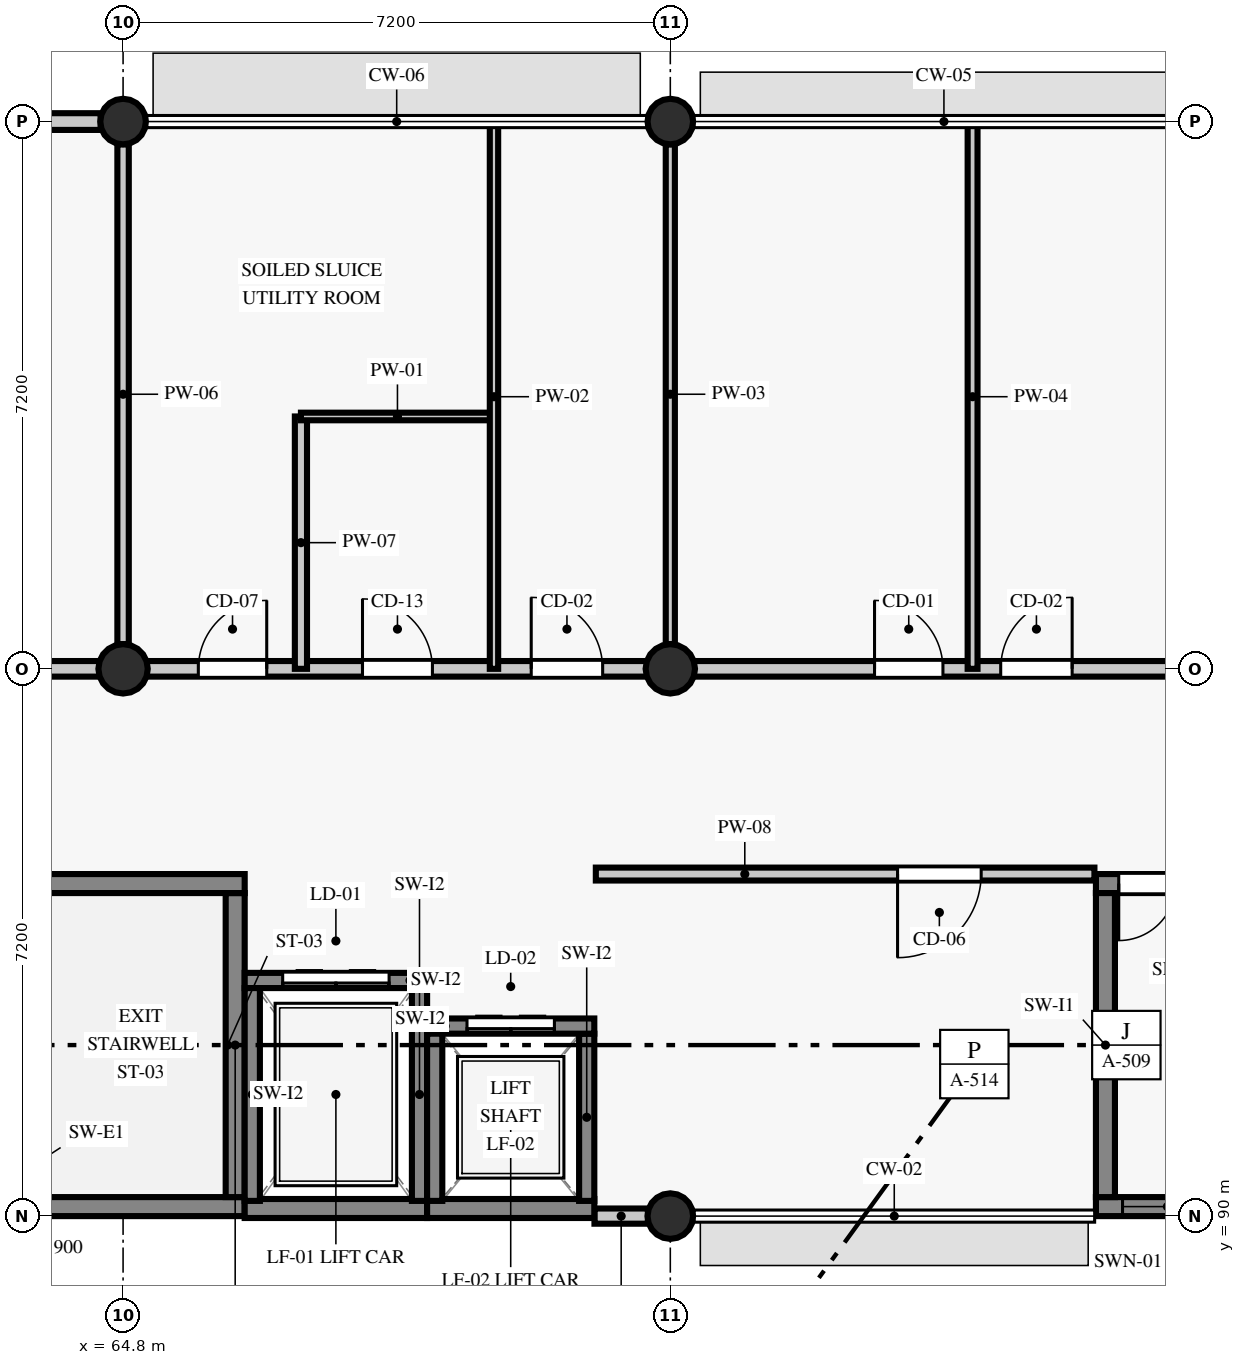
"""IFC4 building model, lengths in metres.
Left out: names, types, materials, properties, quantities, classifications, styles, units other than length and angle.
Written with IfcOpenShell. Run it as: python <this file> out.ifc"""

import sys

from ifc_helpers import new_model, si_unit, direction, frame, frame_2d, origin, origin_2d, place, context, subcontext, project, spatial, rectangle, circle, extrude, element, fill, save


model = new_model("IFC4")
c1 = context("Model", 3, precision=1e-05, world=origin(), true_north=direction((0.0, 1.0)))
c2 = subcontext(c1, "Body", "Model", "MODEL_VIEW")
j1 = project(units=[si_unit("LENGTHUNIT", "METRE"), si_unit("PLANEANGLEUNIT", "RADIAN")], contexts=[c1])
p1 = place(None, origin())
s1 = spatial("IfcSite", under=j1, at=p1, CompositionType="ELEMENT")
p2 = place(p1, origin())
s2 = spatial("IfcBuilding", under=s1, at=p2, CompositionType="ELEMENT")
p3 = place(p2, frame((0.0, 0.0, 9.6)))
s3 = spatial("IfcBuildingStorey", under=s2, at=p3, CompositionType="ELEMENT", Elevation=9.6)
p4 = place(p3, frame((64.8, 97.2, 0.0), z_axis=(0.0, 0.0, 1.0), x_axis=(1.0, 0.0, 0.0)))
e1 = element("IfcColumn", 1, at=p4, inside=s3, PredefinedType="COLUMN", context=c2, shape_type="SweptSolid", body=[
    extrude(circle(Radius=0.325, at=origin_2d()), origin(), (0.0, 0.0, 1.0), 3.95),
])
for number, where, z_axis, x_axis in (
    (2, (64.8, 104.4, 0.0), (0.0, 0.0, 1.0), (1.0, 0.0, 0.0)),
    (3, (72.0, 90.0, 0.0), (0.0, 0.0, 1.0), (1.0, 0.0, 0.0)),
):
    element("IfcColumn", number, at=place(p3, frame(where, z_axis=z_axis, x_axis=x_axis)), inside=s3, PredefinedType="COLUMN", context=c2, shape_type="SweptSolid", body=[
        extrude(circle(Radius=0.3, at=origin_2d()), origin(), (0.0, 0.0, 1.0), 3.95),
    ])
p5 = place(p3, frame((72.0, 97.2, 0.0), z_axis=(0.0, 0.0, 1.0), x_axis=(1.0, 0.0, 0.0)))
e4 = element("IfcColumn", 4, at=p5, inside=s3, PredefinedType="COLUMN", context=c2, shape_type="SweptSolid", body=[
    extrude(circle(Radius=0.325, at=origin_2d()), origin(), (0.0, 0.0, 1.0), 3.95),
])
p6 = place(p3, frame((72.0, 104.4, 0.0), z_axis=(0.0, 0.0, 1.0), x_axis=(1.0, 0.0, 0.0)))
e5 = element("IfcColumn", 5, at=p6, inside=s3, PredefinedType="COLUMN", context=c2, shape_type="SweptSolid", body=[
    extrude(circle(Radius=0.3, at=origin_2d()), origin(), (0.0, 0.0, 1.0), 3.95),
])
p7 = place(p3, frame((71.002, 90.0, 0.0), z_axis=(0.0, 0.0, 1.0), x_axis=(1.0, 0.0, 0.0)))
e6 = element("IfcWall", 6, at=p7, inside=s3, PredefinedType="STANDARD", context=c2, shape_type="SweptSolid", body=[
    extrude(rectangle(XDim=0.703, YDim=0.2, at=frame_2d((0.352, 0.0))), origin(), (0.0, 0.0, 1.0), 3.95),
])
p8 = place(p3, frame((64.505, 104.4, 0.0), z_axis=(0.0, 0.0, 1.0), x_axis=(-1.0, 0.0, 0.0)))
e7 = element("IfcWall", 7, at=p8, inside=s3, PredefinedType="STANDARD", context=c2, shape_type="SweptSolid", body=[
    extrude(rectangle(XDim=6.61, YDim=0.22, at=frame_2d((3.305, 0.0))), origin(), (0.0, 0.0, 1.0), 3.3),
])
p9 = place(p8, frame((2.48, 0.0, 0.9)))
e8 = element("IfcOpeningElement", 8, at=p9, cuts=e7, PredefinedType="OPENING", context=c2, shape_type="SweptSolid", body=[
    extrude(rectangle(XDim=1.65, YDim=1.54, at=frame_2d((0.825, 0.77))), frame((0.0, 0.12, 0.0), z_axis=(0.0, -1.0, 0.0), x_axis=(1.0, 0.0, 0.0)), (0.0, 0.0, 1.0), 0.24),
])
p10 = place(p3, frame((57.6, 90.125, 0.0), z_axis=(0.0, 0.0, 1.0), x_axis=(1.0, 0.0, 0.0)))
e9 = element("IfcWall", 9, at=p10, inside=s3, PredefinedType="SHEAR", context=c2, shape_type="SweptSolid", body=[
    extrude(rectangle(XDim=8.8, YDim=0.25, at=frame_2d((4.4, 0.0))), origin(), (0.0, 0.0, 1.0), 3.95),
])
p11 = place(p10, frame((0.35, 0.0, 0.92)))
e10 = element("IfcOpeningElement", 10, at=p11, cuts=e9, PredefinedType="OPENING", context=c2, shape_type="SweptSolid", body=[
    extrude(rectangle(XDim=1.18, YDim=1.48, at=frame_2d((0.59, 0.74))), frame((0.0, 0.135, 0.0), z_axis=(0.0, -1.0, 0.0), x_axis=(1.0, 0.0, 0.0)), (0.0, 0.0, 1.0), 0.27),
])
p12 = place(p3, frame((66.275, 90.25, 0.0), z_axis=(0.0, 0.0, 1.0), x_axis=(0.0, 1.0, 0.0)))
e11 = element("IfcWall", 11, at=p12, inside=s3, PredefinedType="SHEAR", context=c2, shape_type="SweptSolid", body=[
    extrude(rectangle(XDim=4.0, YDim=0.25, at=frame_2d((2.0, 0.0))), origin(), (0.0, 0.0, 1.0), 3.95),
])
p13 = place(p3, frame((66.4, 94.375, 0.0), z_axis=(0.0, 0.0, 1.0), x_axis=(-1.0, 0.0, 0.0)))
e12 = element("IfcWall", 12, at=p13, inside=s3, PredefinedType="SHEAR", context=c2, shape_type="SweptSolid", body=[
    extrude(rectangle(XDim=8.8, YDim=0.25, at=frame_2d((4.4, 0.0))), origin(), (0.0, 0.0, 1.0), 3.95),
])
p14 = place(p13, frame((7.0, 0.0, 0.0)))
e13 = element("IfcOpeningElement", 13, at=p14, cuts=e12, PredefinedType="OPENING", context=c2, shape_type="SweptSolid", body=[
    extrude(rectangle(XDim=1.5, YDim=2.15, at=frame_2d((0.75, 1.075))), frame((0.0, 0.135, 0.0), z_axis=(0.0, -1.0, 0.0), x_axis=(1.0, 0.0, 0.0)), (0.0, 0.0, 1.0), 0.27),
])
p15 = place(p3, frame((77.6, 90.125, 0.0), z_axis=(0.0, 0.0, 1.0), x_axis=(1.0, 0.0, 0.0)))
e14 = element("IfcWall", 14, at=p15, inside=s3, PredefinedType="SHEAR", context=c2, shape_type="SweptSolid", body=[
    extrude(rectangle(XDim=8.8, YDim=0.25, at=frame_2d((4.4, 0.0))), origin(), (0.0, 0.0, 1.0), 3.95),
])
p16 = place(p15, frame((0.35, 0.0, 0.92)))
e15 = element("IfcOpeningElement", 15, at=p16, cuts=e14, PredefinedType="OPENING", context=c2, shape_type="SweptSolid", body=[
    extrude(rectangle(XDim=1.18, YDim=1.48, at=frame_2d((0.59, 0.74))), frame((0.0, 0.135, 0.0), z_axis=(0.0, -1.0, 0.0), x_axis=(1.0, 0.0, 0.0)), (0.0, 0.0, 1.0), 0.27),
])
p17 = place(p3, frame((86.4, 94.375, 0.0), z_axis=(0.0, 0.0, 1.0), x_axis=(-1.0, 0.0, 0.0)))
e16 = element("IfcWall", 16, at=p17, inside=s3, PredefinedType="SHEAR", context=c2, shape_type="SweptSolid", body=[
    extrude(rectangle(XDim=8.8, YDim=0.25, at=frame_2d((4.4, 0.0))), origin(), (0.0, 0.0, 1.0), 3.95),
])
p18 = place(p17, frame((7.0, 0.0, 0.0)))
e17 = element("IfcOpeningElement", 17, at=p18, cuts=e16, PredefinedType="OPENING", context=c2, shape_type="SweptSolid", body=[
    extrude(rectangle(XDim=1.5, YDim=2.15, at=frame_2d((0.75, 1.075))), frame((0.0, 0.135, 0.0), z_axis=(0.0, -1.0, 0.0), x_axis=(1.0, 0.0, 0.0)), (0.0, 0.0, 1.0), 0.27),
])
p19 = place(p3, frame((77.725, 94.25, 0.0), z_axis=(0.0, 0.0, 1.0), x_axis=(0.0, -1.0, 0.0)))
e18 = element("IfcWall", 18, at=p19, inside=s3, PredefinedType="SHEAR", context=c2, shape_type="SweptSolid", body=[
    extrude(rectangle(XDim=4.0, YDim=0.25, at=frame_2d((2.0, 0.0))), origin(), (0.0, 0.0, 1.0), 3.95),
])
p20 = place(p3, frame((66.4, 90.1, 0.0), z_axis=(0.0, 0.0, 1.0), x_axis=(1.0, 0.0, 0.0)))
e19 = element("IfcWall", 19, at=p20, inside=s3, PredefinedType="SHEAR", context=c2, shape_type="SweptSolid", body=[
    extrude(rectangle(XDim=2.4, YDim=0.25, at=frame_2d((1.2, 0.0))), origin(), (0.0, 0.0, 1.0), 3.95),
])
p21 = place(p3, frame((68.7, 90.2, 0.0), z_axis=(0.0, 0.0, 1.0), x_axis=(0.0, 1.0, 0.0)))
e20 = element("IfcWall", 20, at=p21, inside=s3, PredefinedType="SHEAR", context=c2, shape_type="SweptSolid", body=[
    extrude(rectangle(XDim=2.8, YDim=0.2, at=frame_2d((1.4, 0.0))), origin(), (0.0, 0.0, 1.0), 3.95),
])
p22 = place(p3, frame((68.8, 93.1, 0.0), z_axis=(0.0, 0.0, 1.0), x_axis=(-1.0, 0.0, 0.0)))
e21 = element("IfcWall", 21, at=p22, inside=s3, PredefinedType="SHEAR", context=c2, shape_type="SweptSolid", body=[
    extrude(rectangle(XDim=2.4, YDim=0.2, at=frame_2d((1.2, 0.0))), origin(), (0.0, 0.0, 1.0), 3.95),
])
p23 = place(p22, frame((0.5, 0.0, 0.0)))
e22 = element("IfcOpeningElement", 22, at=p23, cuts=e21, PredefinedType="OPENING", context=c2, shape_type="SweptSolid", body=[
    extrude(rectangle(XDim=1.4, YDim=2.15, at=frame_2d((0.7, 1.075))), frame((0.0, 0.11, 0.0), z_axis=(0.0, -1.0, 0.0), x_axis=(1.0, 0.0, 0.0)), (0.0, 0.0, 1.0), 0.22),
])
p24 = place(p3, frame((66.5, 93.0, 0.0), z_axis=(0.0, 0.0, 1.0), x_axis=(0.0, -1.0, 0.0)))
e23 = element("IfcWall", 23, at=p24, inside=s3, PredefinedType="SHEAR", context=c2, shape_type="SweptSolid", body=[
    extrude(rectangle(XDim=2.8, YDim=0.2, at=frame_2d((1.4, 0.0))), origin(), (0.0, 0.0, 1.0), 3.95),
])
p25 = place(p3, frame((68.8, 90.1, 0.0), z_axis=(0.0, 0.0, 1.0), x_axis=(1.0, 0.0, 0.0)))
e24 = element("IfcWall", 24, at=p25, inside=s3, PredefinedType="SHEAR", context=c2, shape_type="SweptSolid", body=[
    extrude(rectangle(XDim=2.2, YDim=0.25, at=frame_2d((1.1, 0.0))), origin(), (0.0, 0.0, 1.0), 3.95),
])
p26 = place(p3, frame((70.9, 90.2, 0.0), z_axis=(0.0, 0.0, 1.0), x_axis=(0.0, 1.0, 0.0)))
e25 = element("IfcWall", 25, at=p26, inside=s3, PredefinedType="SHEAR", context=c2, shape_type="SweptSolid", body=[
    extrude(rectangle(XDim=2.2, YDim=0.2, at=frame_2d((1.1, 0.0))), origin(), (0.0, 0.0, 1.0), 3.95),
])
p27 = place(p3, frame((71.0, 92.5, 0.0), z_axis=(0.0, 0.0, 1.0), x_axis=(-1.0, 0.0, 0.0)))
e26 = element("IfcWall", 26, at=p27, inside=s3, PredefinedType="SHEAR", context=c2, shape_type="SweptSolid", body=[
    extrude(rectangle(XDim=2.2, YDim=0.2, at=frame_2d((1.1, 0.0))), origin(), (0.0, 0.0, 1.0), 3.95),
])
p28 = place(p27, frame((0.525, 0.0, 0.0)))
e27 = element("IfcOpeningElement", 27, at=p28, cuts=e26, PredefinedType="OPENING", context=c2, shape_type="SweptSolid", body=[
    extrude(rectangle(XDim=1.15, YDim=2.15, at=frame_2d((0.575, 1.075))), frame((0.0, 0.11, 0.0), z_axis=(0.0, -1.0, 0.0), x_axis=(1.0, 0.0, 0.0)), (0.0, 0.0, 1.0), 0.22),
])
p29 = place(p3, frame((68.9, 92.4, 0.0), z_axis=(0.0, 0.0, 1.0), x_axis=(0.0, -1.0, 0.0)))
e28 = element("IfcWall", 28, at=p29, inside=s3, PredefinedType="SHEAR", context=c2, shape_type="SweptSolid", body=[
    extrude(rectangle(XDim=2.2, YDim=0.2, at=frame_2d((1.1, 0.0))), origin(), (0.0, 0.0, 1.0), 3.95),
])
p30 = place(p3, frame((50.7, 97.2, 0.0), z_axis=(0.0, 0.0, 1.0), x_axis=(1.0, 0.0, 0.0)))
e29 = element("IfcWall", 29, at=p30, inside=s3, PredefinedType="PARTITIONING", context=c2, shape_type="SweptSolid", body=[
    extrude(rectangle(XDim=35.4, YDim=0.205, at=frame_2d((17.7, 0.0))), origin(), (0.0, 0.0, 1.0), 3.2),
])
p31 = place(p30, frame((2.873, 0.0, 0.0)))
e30 = element("IfcOpeningElement", 30, at=p31, cuts=e29, PredefinedType="OPENING", context=c2, shape_type="SweptSolid", body=[
    extrude(rectangle(XDim=1.18, YDim=2.18, at=frame_2d((0.59, 1.09))), frame((0.0, 0.113, 0.0), z_axis=(0.0, -1.0, 0.0), x_axis=(1.0, 0.0, 0.0)), (0.0, 0.0, 1.0), 0.225),
])
p32 = place(p30, frame((9.816, 0.0, 0.0)))
e31 = element("IfcOpeningElement", 31, at=p32, cuts=e29, PredefinedType="OPENING", context=c2, shape_type="SweptSolid", body=[
    extrude(rectangle(XDim=0.96, YDim=2.23, at=frame_2d((0.48, 1.115))), frame((0.0, 0.113, 0.0), z_axis=(0.0, -1.0, 0.0), x_axis=(1.0, 0.0, 0.0)), (0.0, 0.0, 1.0), 0.225),
])
p33 = place(p30, frame((15.09, 0.0, 0.0)))
e32 = element("IfcOpeningElement", 32, at=p33, cuts=e29, PredefinedType="OPENING", context=c2, shape_type="SweptSolid", body=[
    extrude(rectangle(XDim=0.9, YDim=2.13, at=frame_2d((0.45, 1.065))), frame((0.0, 0.113, 0.0), z_axis=(0.0, -1.0, 0.0), x_axis=(1.0, 0.0, 0.0)), (0.0, 0.0, 1.0), 0.225),
])
p34 = place(p30, frame((17.25, 0.0, 0.0)))
e33 = element("IfcOpeningElement", 33, at=p34, cuts=e29, PredefinedType="OPENING", context=c2, shape_type="SweptSolid", body=[
    extrude(rectangle(XDim=0.92, YDim=2.18, at=frame_2d((0.46, 1.09))), frame((0.0, 0.113, 0.0), z_axis=(0.0, -1.0, 0.0), x_axis=(1.0, 0.0, 0.0)), (0.0, 0.0, 1.0), 0.225),
])
p35 = place(p30, frame((19.47, 0.0, 0.0)))
e34 = element("IfcOpeningElement", 34, at=p35, cuts=e29, PredefinedType="OPENING", context=c2, shape_type="SweptSolid", body=[
    extrude(rectangle(XDim=0.94, YDim=2.08, at=frame_2d((0.47, 1.04))), frame((0.0, 0.113, 0.0), z_axis=(0.0, -1.0, 0.0), x_axis=(1.0, 0.0, 0.0)), (0.0, 0.0, 1.0), 0.225),
])
p36 = place(p30, frame((23.987, 0.0, 0.0)))
e35 = element("IfcOpeningElement", 35, at=p36, cuts=e29, PredefinedType="OPENING", context=c2, shape_type="SweptSolid", body=[
    extrude(rectangle(XDim=0.9, YDim=2.08, at=frame_2d((0.45, 1.04))), frame((0.0, 0.113, 0.0), z_axis=(0.0, -1.0, 0.0), x_axis=(1.0, 0.0, 0.0)), (0.0, 0.0, 1.0), 0.225),
])
p37 = place(p30, frame((25.647, 0.0, 0.0)))
e36 = element("IfcOpeningElement", 36, at=p37, cuts=e29, PredefinedType="OPENING", context=c2, shape_type="SweptSolid", body=[
    extrude(rectangle(XDim=0.94, YDim=2.08, at=frame_2d((0.47, 1.04))), frame((0.0, 0.113, 0.0), z_axis=(0.0, -1.0, 0.0), x_axis=(1.0, 0.0, 0.0)), (0.0, 0.0, 1.0), 0.225),
])
p38 = place(p30, frame((31.749, 0.0, 0.0)))
e37 = element("IfcOpeningElement", 37, at=p38, cuts=e29, PredefinedType="OPENING", context=c2, shape_type="SweptSolid", body=[
    extrude(rectangle(XDim=0.98, YDim=2.08, at=frame_2d((0.49, 1.04))), frame((0.0, 0.113, 0.0), z_axis=(0.0, -1.0, 0.0), x_axis=(1.0, 0.0, 0.0)), (0.0, 0.0, 1.0), 0.225),
])
p39 = place(p3, frame((64.8, 97.525, 0.0), z_axis=(0.0, 0.0, 1.0), x_axis=(0.0, 1.0, 0.0)))
e38 = element("IfcWall", 38, at=p39, inside=s3, PredefinedType="PARTITIONING", context=c2, shape_type="SweptSolid", body=[
    extrude(rectangle(XDim=6.575, YDim=0.15, at=frame_2d((3.288, 0.0))), origin(), (0.0, 0.0, 1.0), 3.4),
])
p40 = place(p3, frame((67.14, 97.2, 0.0), z_axis=(0.0, 0.0, 1.0), x_axis=(0.0, 1.0, 0.0)))
e39 = element("IfcWall", 39, at=p40, inside=s3, PredefinedType="PARTITIONING", context=c2, shape_type="SweptSolid", body=[
    extrude(rectangle(XDim=3.32, YDim=0.16, at=frame_2d((1.66, 0.0))), origin(), (0.0, 0.0, 1.0), 3.2),
])
p41 = place(p3, frame((67.14, 100.52, 0.0), z_axis=(0.0, 0.0, 1.0), x_axis=(1.0, 0.0, 0.0)))
e40 = element("IfcWall", 40, at=p41, inside=s3, PredefinedType="PARTITIONING", context=c2, shape_type="SweptSolid", body=[
    extrude(rectangle(XDim=2.54, YDim=0.1, at=frame_2d((1.27, 0.0))), origin(), (0.0, 0.0, 1.0), 3.95),
])
p42 = place(p3, frame((69.68, 97.2, 0.0), z_axis=(0.0, 0.0, 1.0), x_axis=(0.0, 1.0, 0.0)))
e41 = element("IfcWall", 41, at=p42, inside=s3, PredefinedType="PARTITIONING", context=c2, shape_type="SweptSolid", body=[
    extrude(rectangle(XDim=7.16, YDim=0.11, at=frame_2d((3.58, 0.0))), origin(), (0.0, 0.0, 1.0), 3.2),
])
p43 = place(p3, frame((72.0, 97.525, 0.0), z_axis=(0.0, 0.0, 1.0), x_axis=(0.0, 1.0, 0.0)))
e42 = element("IfcWall", 42, at=p43, inside=s3, PredefinedType="PARTITIONING", context=c2, shape_type="SweptSolid", body=[
    extrude(rectangle(XDim=6.575, YDim=0.12, at=frame_2d((3.288, 0.0))), origin(), (0.0, 0.0, 1.0), 3.4),
])
p44 = place(p3, frame((75.977, 97.2, 0.0), z_axis=(0.0, 0.0, 1.0), x_axis=(0.0, 1.0, 0.0)))
e43 = element("IfcWall", 43, at=p44, inside=s3, PredefinedType="PARTITIONING", context=c2, shape_type="SweptSolid", body=[
    extrude(rectangle(XDim=7.16, YDim=0.13, at=frame_2d((3.58, 0.0))), origin(), (0.0, 0.0, 1.0), 3.2),
])
p45 = place(p3, frame((71.02, 94.5, 0.0), z_axis=(0.0, 0.0, 1.0), x_axis=(1.0, 0.0, 0.0)))
e44 = element("IfcWall", 44, at=p45, inside=s3, PredefinedType="PARTITIONING", context=c2, shape_type="SweptSolid", body=[
    extrude(rectangle(XDim=6.56, YDim=0.17, at=frame_2d((3.28, 0.0))), origin(), (0.0, 0.0, 1.0), 3.4),
])
p46 = place(p45, frame((3.97, 0.0, 0.0)))
e45 = element("IfcOpeningElement", 45, at=p46, cuts=e44, PredefinedType="OPENING", context=c2, shape_type="SweptSolid", body=[
    extrude(rectangle(XDim=1.1, YDim=2.08, at=frame_2d((0.55, 1.04))), frame((0.0, 0.095, 0.0), z_axis=(0.0, -1.0, 0.0), x_axis=(1.0, 0.0, 0.0)), (0.0, 0.0, 1.0), 0.19),
])
p47 = place(p16, origin())
e46 = element("IfcWindow", 46, at=p47, inside=s3, PartitioningType="SINGLE_PANEL", PredefinedType="WINDOW", context=c2, shape_type="SweptSolid", body=[
    extrude(rectangle(XDim=1.18, YDim=1.48, at=frame_2d((0.59, 0.74))), frame((0.0, 0.03, 0.0), z_axis=(0.0, -1.0, 0.0), x_axis=(1.0, 0.0, 0.0)), (0.0, 0.0, 1.0), 0.06),
])
fill(e15, e46)
p48 = place(p18, origin())
e47 = element("IfcDoor", 47, at=p48, inside=s3, OperationType="DOUBLE_DOOR_SINGLE_SWING", PredefinedType="DOOR", context=c2, shape_type="SweptSolid", body=[
    extrude(rectangle(XDim=1.5, YDim=2.15, at=frame_2d((0.75, 1.075))), frame((0.0, 0.025, 0.0), z_axis=(0.0, -1.0, 0.0), x_axis=(1.0, 0.0, 0.0)), (0.0, 0.0, 1.0), 0.05),
])
fill(e17, e47)
p49 = place(p23, frame((1.4, 0.0, 0.0), z_axis=(0.0, 0.0, 1.0), x_axis=(-1.0, 0.0, 0.0)))
e48 = element("IfcDoor", 48, at=p49, inside=s3, OperationType="DOUBLE_DOOR_SLIDING", PredefinedType="DOOR", context=c2, shape_type="SweptSolid", body=[
    extrude(rectangle(XDim=1.4, YDim=2.15, at=frame_2d((0.7, 1.075))), frame((0.0, 0.025, 0.0), z_axis=(0.0, -1.0, 0.0), x_axis=(1.0, 0.0, 0.0)), (0.0, 0.0, 1.0), 0.05),
])
fill(e22, e48)
p50 = place(p28, frame((1.15, 0.0, 0.0), z_axis=(0.0, 0.0, 1.0), x_axis=(-1.0, 0.0, 0.0)))
e49 = element("IfcDoor", 49, at=p50, inside=s3, OperationType="DOUBLE_DOOR_SLIDING", PredefinedType="DOOR", context=c2, shape_type="SweptSolid", body=[
    extrude(rectangle(XDim=1.15, YDim=2.15, at=frame_2d((0.575, 1.075))), frame((0.0, 0.025, 0.0), z_axis=(0.0, -1.0, 0.0), x_axis=(1.0, 0.0, 0.0)), (0.0, 0.0, 1.0), 0.05),
])
fill(e27, e49)
p51 = place(p33, origin())
e50 = element("IfcDoor", 50, at=p51, inside=s3, OperationType="SINGLE_SWING_RIGHT", PredefinedType="DOOR", context=c2, shape_type="SweptSolid", body=[
    extrude(rectangle(XDim=0.9, YDim=2.13, at=frame_2d((0.45, 1.065))), frame((0.0, 0.025, 0.0), z_axis=(0.0, -1.0, 0.0), x_axis=(1.0, 0.0, 0.0)), (0.0, 0.0, 1.0), 0.05),
])
fill(e32, e50)
p52 = place(p34, origin())
e51 = element("IfcDoor", 51, at=p52, inside=s3, OperationType="SINGLE_SWING_LEFT", PredefinedType="DOOR", context=c2, shape_type="SweptSolid", body=[
    extrude(rectangle(XDim=0.92, YDim=2.18, at=frame_2d((0.46, 1.09))), frame((0.0, 0.025, 0.0), z_axis=(0.0, -1.0, 0.0), x_axis=(1.0, 0.0, 0.0)), (0.0, 0.0, 1.0), 0.05),
])
fill(e33, e51)
p53 = place(p35, origin())
e52 = element("IfcDoor", 52, at=p53, inside=s3, OperationType="SINGLE_SWING_LEFT", PredefinedType="DOOR", context=c2, shape_type="SweptSolid", body=[
    extrude(rectangle(XDim=0.94, YDim=2.08, at=frame_2d((0.47, 1.04))), frame((0.0, 0.025, 0.0), z_axis=(0.0, -1.0, 0.0), x_axis=(1.0, 0.0, 0.0)), (0.0, 0.0, 1.0), 0.05),
])
fill(e34, e52)
p54 = place(p36, origin())
e53 = element("IfcDoor", 53, at=p54, inside=s3, OperationType="SINGLE_SWING_LEFT", PredefinedType="DOOR", context=c2, shape_type="SweptSolid", body=[
    extrude(rectangle(XDim=0.9, YDim=2.08, at=frame_2d((0.45, 1.04))), frame((0.0, 0.025, 0.0), z_axis=(0.0, -1.0, 0.0), x_axis=(1.0, 0.0, 0.0)), (0.0, 0.0, 1.0), 0.05),
])
fill(e35, e53)
p55 = place(p37, origin())
e54 = element("IfcDoor", 54, at=p55, inside=s3, OperationType="SINGLE_SWING_RIGHT", PredefinedType="DOOR", context=c2, shape_type="SweptSolid", body=[
    extrude(rectangle(XDim=0.94, YDim=2.08, at=frame_2d((0.47, 1.04))), frame((0.0, 0.025, 0.0), z_axis=(0.0, -1.0, 0.0), x_axis=(1.0, 0.0, 0.0)), (0.0, 0.0, 1.0), 0.05),
])
fill(e36, e54)
p56 = place(p46, frame((1.1, 0.0, 0.0), z_axis=(0.0, 0.0, 1.0), x_axis=(-1.0, 0.0, 0.0)))
e55 = element("IfcDoor", 55, at=p56, inside=s3, OperationType="SINGLE_SWING_RIGHT", PredefinedType="DOOR", context=c2, shape_type="SweptSolid", body=[
    extrude(rectangle(XDim=1.1, YDim=2.08, at=frame_2d((0.55, 1.04))), frame((0.0, 0.025, 0.0), z_axis=(0.0, -1.0, 0.0), x_axis=(1.0, 0.0, 0.0)), (0.0, 0.0, 1.0), 0.05),
])
fill(e45, e55)
save(model, sys.argv[1])
